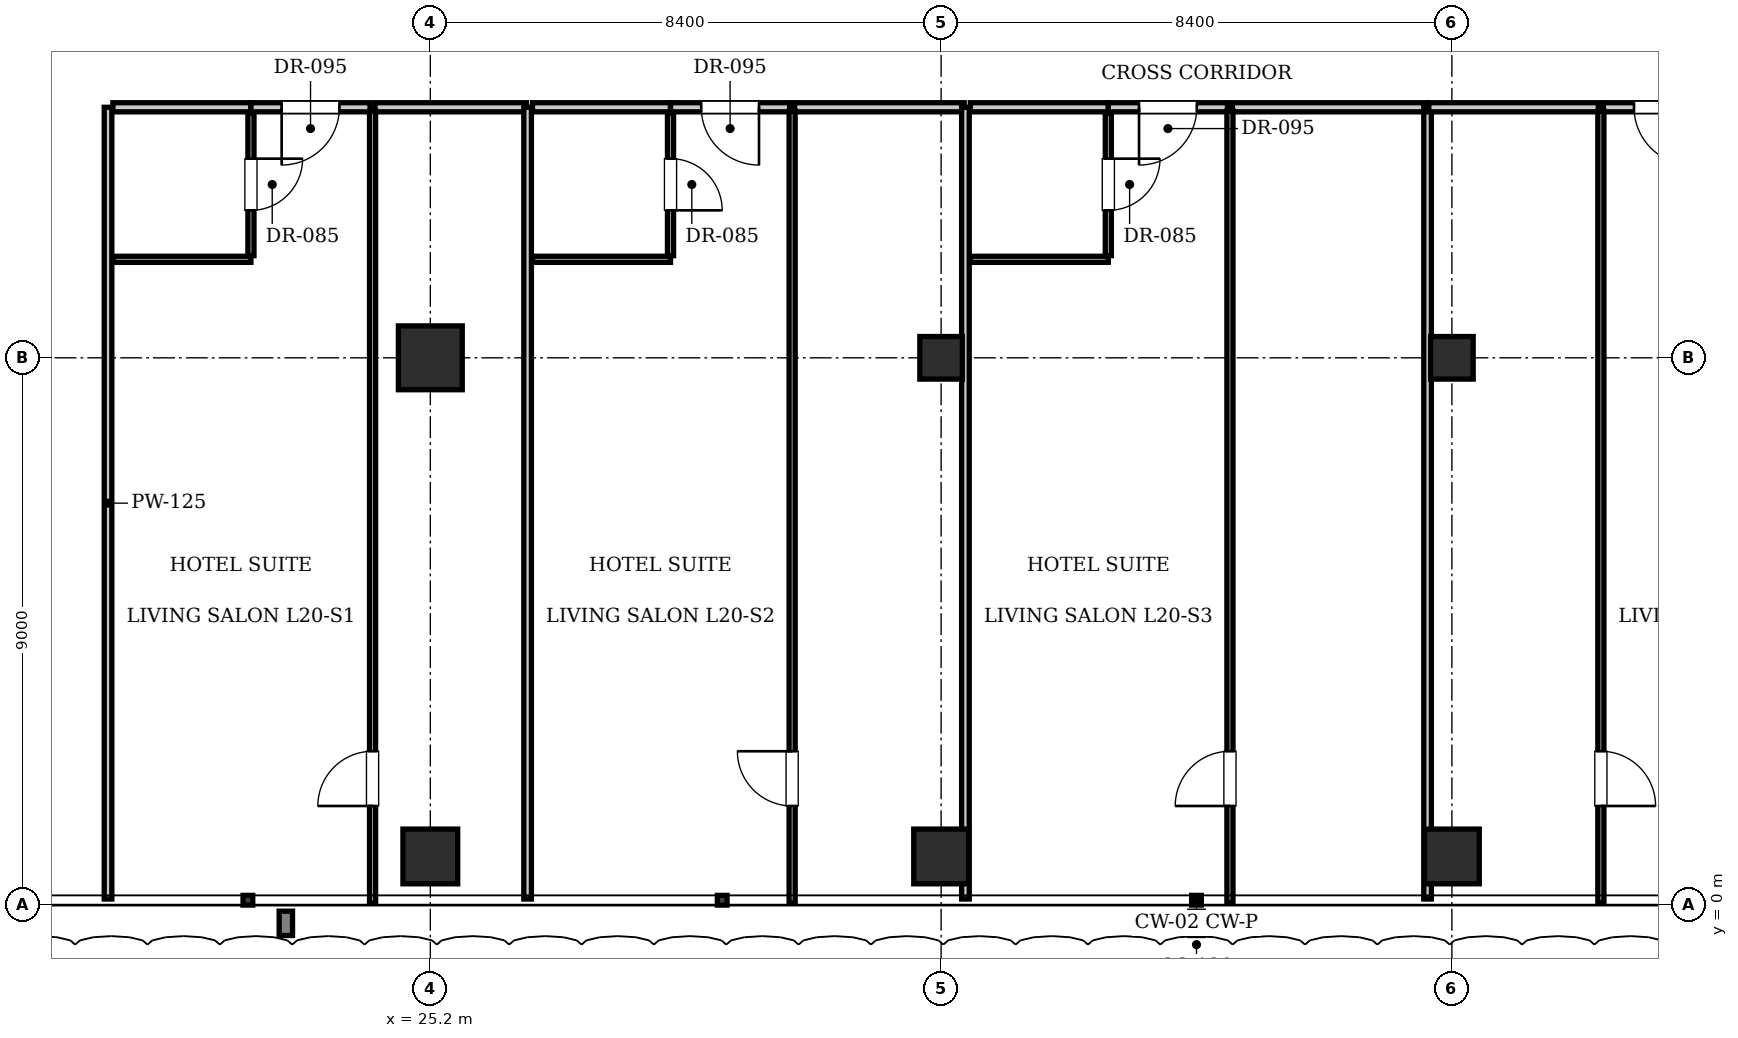
"""IFC4 building model, lengths in metres.
Left out: names, types, materials, properties, quantities, classifications, styles, units other than length and angle.
Written with IfcOpenShell. Run it as: python <this file> out.ifc"""

import sys

from ifc_helpers import new_model, si_unit, direction, frame, frame_2d, origin, origin_2d, place, context, subcontext, project, spatial, rectangle, i_section, extrude, element, fill, save


model = new_model("IFC4")
c1 = context("Model", 3, precision=1e-05, world=origin(), true_north=direction((0.0, 1.0)))
c2 = subcontext(c1, "Body", "Model", "MODEL_VIEW")
j1 = project(units=[si_unit("LENGTHUNIT", "METRE"), si_unit("PLANEANGLEUNIT", "RADIAN")], contexts=[c1])
p1 = place(None, origin())
s1 = spatial("IfcSite", under=j1, at=p1, CompositionType="ELEMENT")
p2 = place(p1, origin())
s2 = spatial("IfcBuilding", under=s1, at=p2, CompositionType="ELEMENT")
p3 = place(p2, frame((0.0, 0.0, 84.7)))
s3 = spatial("IfcBuildingStorey", under=s2, at=p3, CompositionType="ELEMENT", Elevation=84.7)
p4 = place(p3, frame((25.2, 9.0, 0.0), z_axis=(0.0, 0.0, 1.0), x_axis=(1.0, 0.0, 0.0)))
e1 = element("IfcColumn", 1, at=p4, inside=s3, PredefinedType="COLUMN", context=c2, shape_type="SweptSolid", body=[
    extrude(rectangle(XDim=1.05, YDim=1.05, at=origin_2d()), origin(), (0.0, 0.0, 1.0), 3.85),
])
for number, where, z_axis, x_axis in (
    (2, (33.6, 9.0, 0.0), (0.0, 0.0, 1.0), (1.0, 0.0, 0.0)),
    (3, (42.0, 9.0, 0.0), (0.0, 0.0, 1.0), (1.0, 0.0, 0.0)),
):
    element("IfcColumn", number, at=place(p3, frame(where, z_axis=z_axis, x_axis=x_axis)), inside=s3, PredefinedType="COLUMN", context=c2, shape_type="SweptSolid", body=[
        extrude(i_section(OverallWidth=0.7, OverallDepth=0.7, WebThickness=0.028, FlangeThickness=0.044, at=origin_2d()), origin(), (0.0, 0.0, 1.0), 3.85),
    ])
for number, where, z_axis, x_axis in (
    (4, (25.2, 0.8, 0.0), (0.0, 0.0, 1.0), (1.0, 0.0, 0.0)),
    (5, (33.6, 0.8, 0.0), (0.0, 0.0, 1.0), (1.0, 0.0, 0.0)),
    (6, (42.0, 0.8, 0.0), (0.0, 0.0, 1.0), (1.0, 0.0, 0.0)),
):
    element("IfcColumn", number, at=place(p3, frame(where, z_axis=z_axis, x_axis=x_axis)), inside=s3, PredefinedType="COLUMN", context=c2, shape_type="SweptSolid", body=[
        extrude(rectangle(XDim=0.9, YDim=0.9, at=origin_2d()), origin(), (0.0, 0.0, 1.0), 3.85),
    ])
p5 = place(p3, frame((19.9, 0.1, 0.0), z_axis=(0.0, 0.0, 1.0), x_axis=(0.0, 1.0, 0.0)))
e7 = element("IfcWall", 7, at=p5, inside=s3, PredefinedType="PARTITIONING", context=c2, shape_type="SweptSolid", body=[
    extrude(rectangle(XDim=13.02, YDim=0.125, at=frame_2d((6.51, 0.0))), origin(), (0.0, 0.0, 1.0), 3.61),
])
p6 = place(p3, frame((19.98, 13.12, 0.0), z_axis=(0.0, 0.0, 1.0), x_axis=(1.0, 0.0, 0.0)))
e8 = element("IfcWall", 8, at=p6, inside=s3, PredefinedType="PARTITIONING", context=c2, shape_type="SweptSolid", body=[
    extrude(rectangle(XDim=2.27, YDim=0.15, at=frame_2d((1.135, 0.0))), origin(), (0.0, 0.0, 1.0), 3.61),
])
p7 = place(p3, frame((19.98, 10.62, 0.0), z_axis=(0.0, 0.0, 1.0), x_axis=(1.0, 0.0, 0.0)))
e9 = element("IfcWall", 9, at=p7, inside=s3, PredefinedType="PARTITIONING", context=c2, shape_type="SweptSolid", body=[
    extrude(rectangle(XDim=2.27, YDim=0.1, at=frame_2d((1.135, 0.0))), origin(), (0.0, 0.0, 1.0), 3.61),
])
p8 = place(p3, frame((22.25, 10.68, 0.0), z_axis=(0.0, 0.0, 1.0), x_axis=(0.0, 1.0, 0.0)))
e10 = element("IfcWall", 10, at=p8, inside=s3, PredefinedType="PARTITIONING", context=c2, shape_type="SweptSolid", body=[
    extrude(rectangle(XDim=2.34, YDim=0.1, at=frame_2d((1.17, 0.0))), origin(), (0.0, 0.0, 1.0), 3.61),
])
p9 = place(p8, frame((0.745, 0.0, 0.0)))
e11 = element("IfcOpeningElement", 11, at=p9, cuts=e10, PredefinedType="OPENING", context=c2, shape_type="SweptSolid", body=[
    extrude(rectangle(XDim=0.85, YDim=2.1, at=frame_2d((0.425, 1.05))), frame((0.0, 0.06, 0.0), z_axis=(0.0, -1.0, 0.0), x_axis=(1.0, 0.0, 0.0)), (0.0, 0.0, 1.0), 0.12),
])
p10 = place(p3, frame((22.25, 13.12, 0.0), z_axis=(0.0, 0.0, 1.0), x_axis=(1.0, 0.0, 0.0)))
e12 = element("IfcWall", 12, at=p10, inside=s3, PredefinedType="PARTITIONING", context=c2, shape_type="SweptSolid", body=[
    extrude(rectangle(XDim=1.96, YDim=0.15, at=frame_2d((0.98, 0.0))), origin(), (0.0, 0.0, 1.0), 3.61),
])
p11 = place(p10, frame((0.505, 0.0, 0.0)))
e13 = element("IfcOpeningElement", 13, at=p11, cuts=e12, PredefinedType="OPENING", context=c2, shape_type="SweptSolid", body=[
    extrude(rectangle(XDim=0.95, YDim=2.15, at=frame_2d((0.475, 1.075))), frame((0.0, 0.085, 0.0), z_axis=(0.0, -1.0, 0.0), x_axis=(1.0, 0.0, 0.0)), (0.0, 0.0, 1.0), 0.17),
])
p12 = place(p3, frame((24.29, 13.12, 0.0), z_axis=(0.0, 0.0, 1.0), x_axis=(1.0, 0.0, 0.0)))
e14 = element("IfcWall", 14, at=p12, inside=s3, PredefinedType="PARTITIONING", context=c2, shape_type="SweptSolid", body=[
    extrude(rectangle(XDim=2.49, YDim=0.15, at=frame_2d((1.245, 0.0))), origin(), (0.0, 0.0, 1.0), 3.61),
])
p13 = place(p3, frame((24.25, 0.03, 0.0), z_axis=(0.0, 0.0, 1.0), x_axis=(0.0, 1.0, 0.0)))
e15 = element("IfcWall", 15, at=p13, inside=s3, PredefinedType="PARTITIONING", context=c2, shape_type="SweptSolid", body=[
    extrude(rectangle(XDim=13.03, YDim=0.1, at=frame_2d((6.515, 0.0))), origin(), (0.0, 0.0, 1.0), 3.61),
])
p14 = place(p13, frame((1.6, 0.0, 0.0)))
e16 = element("IfcOpeningElement", 16, at=p14, cuts=e15, PredefinedType="OPENING", context=c2, shape_type="SweptSolid", body=[
    extrude(rectangle(XDim=0.9, YDim=2.1, at=frame_2d((0.45, 1.05))), frame((0.0, 0.06, 0.0), z_axis=(0.0, -1.0, 0.0), x_axis=(1.0, 0.0, 0.0)), (0.0, 0.0, 1.0), 0.12),
])
p15 = place(p3, frame((26.8, 0.1, 0.0), z_axis=(0.0, 0.0, 1.0), x_axis=(0.0, 1.0, 0.0)))
e17 = element("IfcWall", 17, at=p15, inside=s3, PredefinedType="PARTITIONING", context=c2, shape_type="SweptSolid", body=[
    extrude(rectangle(XDim=13.02, YDim=0.125, at=frame_2d((6.51, 0.0))), origin(), (0.0, 0.0, 1.0), 3.61),
])
p16 = place(p3, frame((26.88, 13.12, 0.0), z_axis=(0.0, 0.0, 1.0), x_axis=(1.0, 0.0, 0.0)))
e18 = element("IfcWall", 18, at=p16, inside=s3, PredefinedType="PARTITIONING", context=c2, shape_type="SweptSolid", body=[
    extrude(rectangle(XDim=2.27, YDim=0.15, at=frame_2d((1.135, 0.0))), origin(), (0.0, 0.0, 1.0), 3.61),
])
p17 = place(p3, frame((26.88, 10.62, 0.0), z_axis=(0.0, 0.0, 1.0), x_axis=(1.0, 0.0, 0.0)))
e19 = element("IfcWall", 19, at=p17, inside=s3, PredefinedType="PARTITIONING", context=c2, shape_type="SweptSolid", body=[
    extrude(rectangle(XDim=2.27, YDim=0.1, at=frame_2d((1.135, 0.0))), origin(), (0.0, 0.0, 1.0), 3.61),
])
p18 = place(p3, frame((29.15, 10.68, 0.0), z_axis=(0.0, 0.0, 1.0), x_axis=(0.0, 1.0, 0.0)))
e20 = element("IfcWall", 20, at=p18, inside=s3, PredefinedType="PARTITIONING", context=c2, shape_type="SweptSolid", body=[
    extrude(rectangle(XDim=2.34, YDim=0.1, at=frame_2d((1.17, 0.0))), origin(), (0.0, 0.0, 1.0), 3.61),
])
p19 = place(p18, frame((0.745, 0.0, 0.0)))
e21 = element("IfcOpeningElement", 21, at=p19, cuts=e20, PredefinedType="OPENING", context=c2, shape_type="SweptSolid", body=[
    extrude(rectangle(XDim=0.85, YDim=2.1, at=frame_2d((0.425, 1.05))), frame((0.0, 0.06, 0.0), z_axis=(0.0, -1.0, 0.0), x_axis=(1.0, 0.0, 0.0)), (0.0, 0.0, 1.0), 0.12),
])
p20 = place(p3, frame((29.15, 13.12, 0.0), z_axis=(0.0, 0.0, 1.0), x_axis=(1.0, 0.0, 0.0)))
e22 = element("IfcWall", 22, at=p20, inside=s3, PredefinedType="PARTITIONING", context=c2, shape_type="SweptSolid", body=[
    extrude(rectangle(XDim=1.96, YDim=0.15, at=frame_2d((0.98, 0.0))), origin(), (0.0, 0.0, 1.0), 3.61),
])
p21 = place(p20, frame((0.505, 0.0, 0.0)))
e23 = element("IfcOpeningElement", 23, at=p21, cuts=e22, PredefinedType="OPENING", context=c2, shape_type="SweptSolid", body=[
    extrude(rectangle(XDim=0.95, YDim=2.15, at=frame_2d((0.475, 1.075))), frame((0.0, 0.085, 0.0), z_axis=(0.0, -1.0, 0.0), x_axis=(1.0, 0.0, 0.0)), (0.0, 0.0, 1.0), 0.17),
])
p22 = place(p3, frame((31.19, 13.12, 0.0), z_axis=(0.0, 0.0, 1.0), x_axis=(1.0, 0.0, 0.0)))
e24 = element("IfcWall", 24, at=p22, inside=s3, PredefinedType="PARTITIONING", context=c2, shape_type="SweptSolid", body=[
    extrude(rectangle(XDim=2.79, YDim=0.15, at=frame_2d((1.395, 0.0))), origin(), (0.0, 0.0, 1.0), 3.61),
])
p23 = place(p3, frame((31.15, 0.03, 0.0), z_axis=(0.0, 0.0, 1.0), x_axis=(0.0, 1.0, 0.0)))
e25 = element("IfcWall", 25, at=p23, inside=s3, PredefinedType="PARTITIONING", context=c2, shape_type="SweptSolid", body=[
    extrude(rectangle(XDim=13.03, YDim=0.1, at=frame_2d((6.515, 0.0))), origin(), (0.0, 0.0, 1.0), 3.61),
])
p24 = place(p23, frame((1.6, 0.0, 0.0)))
e26 = element("IfcOpeningElement", 26, at=p24, cuts=e25, PredefinedType="OPENING", context=c2, shape_type="SweptSolid", body=[
    extrude(rectangle(XDim=0.9, YDim=2.1, at=frame_2d((0.45, 1.05))), frame((0.0, 0.06, 0.0), z_axis=(0.0, -1.0, 0.0), x_axis=(1.0, 0.0, 0.0)), (0.0, 0.0, 1.0), 0.12),
])
p25 = place(p3, frame((34.0, 0.1, 0.0), z_axis=(0.0, 0.0, 1.0), x_axis=(0.0, 1.0, 0.0)))
e27 = element("IfcWall", 27, at=p25, inside=s3, PredefinedType="PARTITIONING", context=c2, shape_type="SweptSolid", body=[
    extrude(rectangle(XDim=13.02, YDim=0.125, at=frame_2d((6.51, 0.0))), origin(), (0.0, 0.0, 1.0), 3.61),
])
p26 = place(p3, frame((34.08, 13.12, 0.0), z_axis=(0.0, 0.0, 1.0), x_axis=(1.0, 0.0, 0.0)))
e28 = element("IfcWall", 28, at=p26, inside=s3, PredefinedType="PARTITIONING", context=c2, shape_type="SweptSolid", body=[
    extrude(rectangle(XDim=2.27, YDim=0.15, at=frame_2d((1.135, 0.0))), origin(), (0.0, 0.0, 1.0), 3.61),
])
p27 = place(p3, frame((34.08, 10.62, 0.0), z_axis=(0.0, 0.0, 1.0), x_axis=(1.0, 0.0, 0.0)))
e29 = element("IfcWall", 29, at=p27, inside=s3, PredefinedType="PARTITIONING", context=c2, shape_type="SweptSolid", body=[
    extrude(rectangle(XDim=2.27, YDim=0.1, at=frame_2d((1.135, 0.0))), origin(), (0.0, 0.0, 1.0), 3.61),
])
p28 = place(p3, frame((36.35, 10.68, 0.0), z_axis=(0.0, 0.0, 1.0), x_axis=(0.0, 1.0, 0.0)))
e30 = element("IfcWall", 30, at=p28, inside=s3, PredefinedType="PARTITIONING", context=c2, shape_type="SweptSolid", body=[
    extrude(rectangle(XDim=2.34, YDim=0.1, at=frame_2d((1.17, 0.0))), origin(), (0.0, 0.0, 1.0), 3.61),
])
p29 = place(p28, frame((0.745, 0.0, 0.0)))
e31 = element("IfcOpeningElement", 31, at=p29, cuts=e30, PredefinedType="OPENING", context=c2, shape_type="SweptSolid", body=[
    extrude(rectangle(XDim=0.85, YDim=2.1, at=frame_2d((0.425, 1.05))), frame((0.0, 0.06, 0.0), z_axis=(0.0, -1.0, 0.0), x_axis=(1.0, 0.0, 0.0)), (0.0, 0.0, 1.0), 0.12),
])
p30 = place(p3, frame((36.35, 13.12, 0.0), z_axis=(0.0, 0.0, 1.0), x_axis=(1.0, 0.0, 0.0)))
e32 = element("IfcWall", 32, at=p30, inside=s3, PredefinedType="PARTITIONING", context=c2, shape_type="SweptSolid", body=[
    extrude(rectangle(XDim=1.96, YDim=0.15, at=frame_2d((0.98, 0.0))), origin(), (0.0, 0.0, 1.0), 3.61),
])
p31 = place(p30, frame((0.505, 0.0, 0.0)))
e33 = element("IfcOpeningElement", 33, at=p31, cuts=e32, PredefinedType="OPENING", context=c2, shape_type="SweptSolid", body=[
    extrude(rectangle(XDim=0.95, YDim=2.15, at=frame_2d((0.475, 1.075))), frame((0.0, 0.085, 0.0), z_axis=(0.0, -1.0, 0.0), x_axis=(1.0, 0.0, 0.0)), (0.0, 0.0, 1.0), 0.17),
])
p32 = place(p3, frame((38.39, 13.12, 0.0), z_axis=(0.0, 0.0, 1.0), x_axis=(1.0, 0.0, 0.0)))
e34 = element("IfcWall", 34, at=p32, inside=s3, PredefinedType="PARTITIONING", context=c2, shape_type="SweptSolid", body=[
    extrude(rectangle(XDim=3.19, YDim=0.15, at=frame_2d((1.595, 0.0))), origin(), (0.0, 0.0, 1.0), 3.61),
])
p33 = place(p3, frame((38.35, 0.03, 0.0), z_axis=(0.0, 0.0, 1.0), x_axis=(0.0, 1.0, 0.0)))
e35 = element("IfcWall", 35, at=p33, inside=s3, PredefinedType="PARTITIONING", context=c2, shape_type="SweptSolid", body=[
    extrude(rectangle(XDim=13.03, YDim=0.1, at=frame_2d((6.515, 0.0))), origin(), (0.0, 0.0, 1.0), 3.61),
])
p34 = place(p33, frame((1.6, 0.0, 0.0)))
e36 = element("IfcOpeningElement", 36, at=p34, cuts=e35, PredefinedType="OPENING", context=c2, shape_type="SweptSolid", body=[
    extrude(rectangle(XDim=0.9, YDim=2.1, at=frame_2d((0.45, 1.05))), frame((0.0, 0.06, 0.0), z_axis=(0.0, -1.0, 0.0), x_axis=(1.0, 0.0, 0.0)), (0.0, 0.0, 1.0), 0.12),
])
p35 = place(p3, frame((41.6, 0.1, 0.0), z_axis=(0.0, 0.0, 1.0), x_axis=(0.0, 1.0, 0.0)))
e37 = element("IfcWall", 37, at=p35, inside=s3, PredefinedType="PARTITIONING", context=c2, shape_type="SweptSolid", body=[
    extrude(rectangle(XDim=13.02, YDim=0.125, at=frame_2d((6.51, 0.0))), origin(), (0.0, 0.0, 1.0), 3.61),
])
p36 = place(p3, frame((41.62, 13.12, 0.0), z_axis=(0.0, 0.0, 1.0), x_axis=(1.0, 0.0, 0.0)))
e38 = element("IfcWall", 38, at=p36, inside=s3, PredefinedType="PARTITIONING", context=c2, shape_type="SweptSolid", body=[
    extrude(rectangle(XDim=2.79, YDim=0.15, at=frame_2d((1.395, 0.0))), origin(), (0.0, 0.0, 1.0), 3.61),
])
p37 = place(p3, frame((44.49, 13.12, 0.0), z_axis=(0.0, 0.0, 1.0), x_axis=(1.0, 0.0, 0.0)))
e39 = element("IfcWall", 39, at=p37, inside=s3, PredefinedType="PARTITIONING", context=c2, shape_type="SweptSolid", body=[
    extrude(rectangle(XDim=1.96, YDim=0.15, at=frame_2d((0.98, 0.0))), origin(), (0.0, 0.0, 1.0), 3.61),
])
p38 = place(p37, frame((0.505, 0.0, 0.0)))
e40 = element("IfcOpeningElement", 40, at=p38, cuts=e39, PredefinedType="OPENING", context=c2, shape_type="SweptSolid", body=[
    extrude(rectangle(XDim=0.95, YDim=2.15, at=frame_2d((0.475, 1.075))), frame((0.0, 0.085, 0.0), z_axis=(0.0, -1.0, 0.0), x_axis=(1.0, 0.0, 0.0)), (0.0, 0.0, 1.0), 0.17),
])
p39 = place(p3, frame((44.45, 0.03, 0.0), z_axis=(0.0, 0.0, 1.0), x_axis=(0.0, 1.0, 0.0)))
e41 = element("IfcWall", 41, at=p39, inside=s3, PredefinedType="PARTITIONING", context=c2, shape_type="SweptSolid", body=[
    extrude(rectangle(XDim=13.03, YDim=0.1, at=frame_2d((6.515, 0.0))), origin(), (0.0, 0.0, 1.0), 3.61),
])
p40 = place(p39, frame((1.6, 0.0, 0.0)))
e42 = element("IfcOpeningElement", 42, at=p40, cuts=e41, PredefinedType="OPENING", context=c2, shape_type="SweptSolid", body=[
    extrude(rectangle(XDim=0.9, YDim=2.1, at=frame_2d((0.45, 1.05))), frame((0.0, 0.06, 0.0), z_axis=(0.0, -1.0, 0.0), x_axis=(1.0, 0.0, 0.0)), (0.0, 0.0, 1.0), 0.12),
])
p41 = place(p9, frame((0.85, 0.0, 0.0), z_axis=(0.0, 0.0, 1.0), x_axis=(-1.0, 0.0, 0.0)))
e43 = element("IfcDoor", 43, at=p41, inside=s3, OperationType="SINGLE_SWING_LEFT", PredefinedType="DOOR", context=c2, shape_type="SweptSolid", body=[
    extrude(rectangle(XDim=0.85, YDim=2.1, at=frame_2d((0.425, 1.05))), frame((0.0, 0.025, 0.0), z_axis=(0.0, -1.0, 0.0), x_axis=(1.0, 0.0, 0.0)), (0.0, 0.0, 1.0), 0.05),
])
fill(e11, e43)
p42 = place(p11, frame((0.95, 0.0, 0.0), z_axis=(0.0, 0.0, 1.0), x_axis=(-1.0, 0.0, 0.0)))
e44 = element("IfcDoor", 44, at=p42, inside=s3, OperationType="SINGLE_SWING_RIGHT", PredefinedType="DOOR", context=c2, shape_type="SweptSolid", body=[
    extrude(rectangle(XDim=0.95, YDim=2.15, at=frame_2d((0.475, 1.075))), frame((0.0, 0.025, 0.0), z_axis=(0.0, -1.0, 0.0), x_axis=(1.0, 0.0, 0.0)), (0.0, 0.0, 1.0), 0.05),
])
fill(e13, e44)
p43 = place(p14, origin())
e45 = element("IfcDoor", 45, at=p43, inside=s3, OperationType="SINGLE_SWING_LEFT", PredefinedType="DOOR", context=c2, shape_type="SweptSolid", body=[
    extrude(rectangle(XDim=0.9, YDim=2.1, at=frame_2d((0.45, 1.05))), frame((0.0, 0.025, 0.0), z_axis=(0.0, -1.0, 0.0), x_axis=(1.0, 0.0, 0.0)), (0.0, 0.0, 1.0), 0.05),
])
fill(e16, e45)
p44 = place(p19, frame((0.85, 0.0, 0.0), z_axis=(0.0, 0.0, 1.0), x_axis=(-1.0, 0.0, 0.0)))
e46 = element("IfcDoor", 46, at=p44, inside=s3, OperationType="SINGLE_SWING_RIGHT", PredefinedType="DOOR", context=c2, shape_type="SweptSolid", body=[
    extrude(rectangle(XDim=0.85, YDim=2.1, at=frame_2d((0.425, 1.05))), frame((0.0, 0.025, 0.0), z_axis=(0.0, -1.0, 0.0), x_axis=(1.0, 0.0, 0.0)), (0.0, 0.0, 1.0), 0.05),
])
fill(e21, e46)
p45 = place(p21, frame((0.95, 0.0, 0.0), z_axis=(0.0, 0.0, 1.0), x_axis=(-1.0, 0.0, 0.0)))
e47 = element("IfcDoor", 47, at=p45, inside=s3, OperationType="SINGLE_SWING_LEFT", PredefinedType="DOOR", context=c2, shape_type="SweptSolid", body=[
    extrude(rectangle(XDim=0.95, YDim=2.15, at=frame_2d((0.475, 1.075))), frame((0.0, 0.025, 0.0), z_axis=(0.0, -1.0, 0.0), x_axis=(1.0, 0.0, 0.0)), (0.0, 0.0, 1.0), 0.05),
])
fill(e23, e47)
p46 = place(p24, origin())
e48 = element("IfcDoor", 48, at=p46, inside=s3, OperationType="SINGLE_SWING_RIGHT", PredefinedType="DOOR", context=c2, shape_type="SweptSolid", body=[
    extrude(rectangle(XDim=0.9, YDim=2.1, at=frame_2d((0.45, 1.05))), frame((0.0, 0.025, 0.0), z_axis=(0.0, -1.0, 0.0), x_axis=(1.0, 0.0, 0.0)), (0.0, 0.0, 1.0), 0.05),
])
fill(e26, e48)
p47 = place(p29, frame((0.85, 0.0, 0.0), z_axis=(0.0, 0.0, 1.0), x_axis=(-1.0, 0.0, 0.0)))
e49 = element("IfcDoor", 49, at=p47, inside=s3, OperationType="SINGLE_SWING_LEFT", PredefinedType="DOOR", context=c2, shape_type="SweptSolid", body=[
    extrude(rectangle(XDim=0.85, YDim=2.1, at=frame_2d((0.425, 1.05))), frame((0.0, 0.025, 0.0), z_axis=(0.0, -1.0, 0.0), x_axis=(1.0, 0.0, 0.0)), (0.0, 0.0, 1.0), 0.05),
])
fill(e31, e49)
p48 = place(p31, frame((0.95, 0.0, 0.0), z_axis=(0.0, 0.0, 1.0), x_axis=(-1.0, 0.0, 0.0)))
e50 = element("IfcDoor", 50, at=p48, inside=s3, OperationType="SINGLE_SWING_RIGHT", PredefinedType="DOOR", context=c2, shape_type="SweptSolid", body=[
    extrude(rectangle(XDim=0.95, YDim=2.15, at=frame_2d((0.475, 1.075))), frame((0.0, 0.025, 0.0), z_axis=(0.0, -1.0, 0.0), x_axis=(1.0, 0.0, 0.0)), (0.0, 0.0, 1.0), 0.05),
])
fill(e33, e50)
p49 = place(p34, origin())
e51 = element("IfcDoor", 51, at=p49, inside=s3, OperationType="SINGLE_SWING_LEFT", PredefinedType="DOOR", context=c2, shape_type="SweptSolid", body=[
    extrude(rectangle(XDim=0.9, YDim=2.1, at=frame_2d((0.45, 1.05))), frame((0.0, 0.025, 0.0), z_axis=(0.0, -1.0, 0.0), x_axis=(1.0, 0.0, 0.0)), (0.0, 0.0, 1.0), 0.05),
])
fill(e36, e51)
p50 = place(p38, frame((0.95, 0.0, 0.0), z_axis=(0.0, 0.0, 1.0), x_axis=(-1.0, 0.0, 0.0)))
e52 = element("IfcDoor", 52, at=p50, inside=s3, OperationType="SINGLE_SWING_LEFT", PredefinedType="DOOR", context=c2, shape_type="SweptSolid", body=[
    extrude(rectangle(XDim=0.95, YDim=2.15, at=frame_2d((0.475, 1.075))), frame((0.0, 0.025, 0.0), z_axis=(0.0, -1.0, 0.0), x_axis=(1.0, 0.0, 0.0)), (0.0, 0.0, 1.0), 0.05),
])
fill(e40, e52)
p51 = place(p40, frame((0.9, 0.0, 0.0), z_axis=(0.0, 0.0, 1.0), x_axis=(-1.0, 0.0, 0.0)))
e53 = element("IfcDoor", 53, at=p51, inside=s3, OperationType="SINGLE_SWING_RIGHT", PredefinedType="DOOR", context=c2, shape_type="SweptSolid", body=[
    extrude(rectangle(XDim=0.9, YDim=2.1, at=frame_2d((0.45, 1.05))), frame((0.0, 0.025, 0.0), z_axis=(0.0, -1.0, 0.0), x_axis=(1.0, 0.0, 0.0)), (0.0, 0.0, 1.0), 0.05),
])
fill(e42, e53)
save(model, sys.argv[1])
